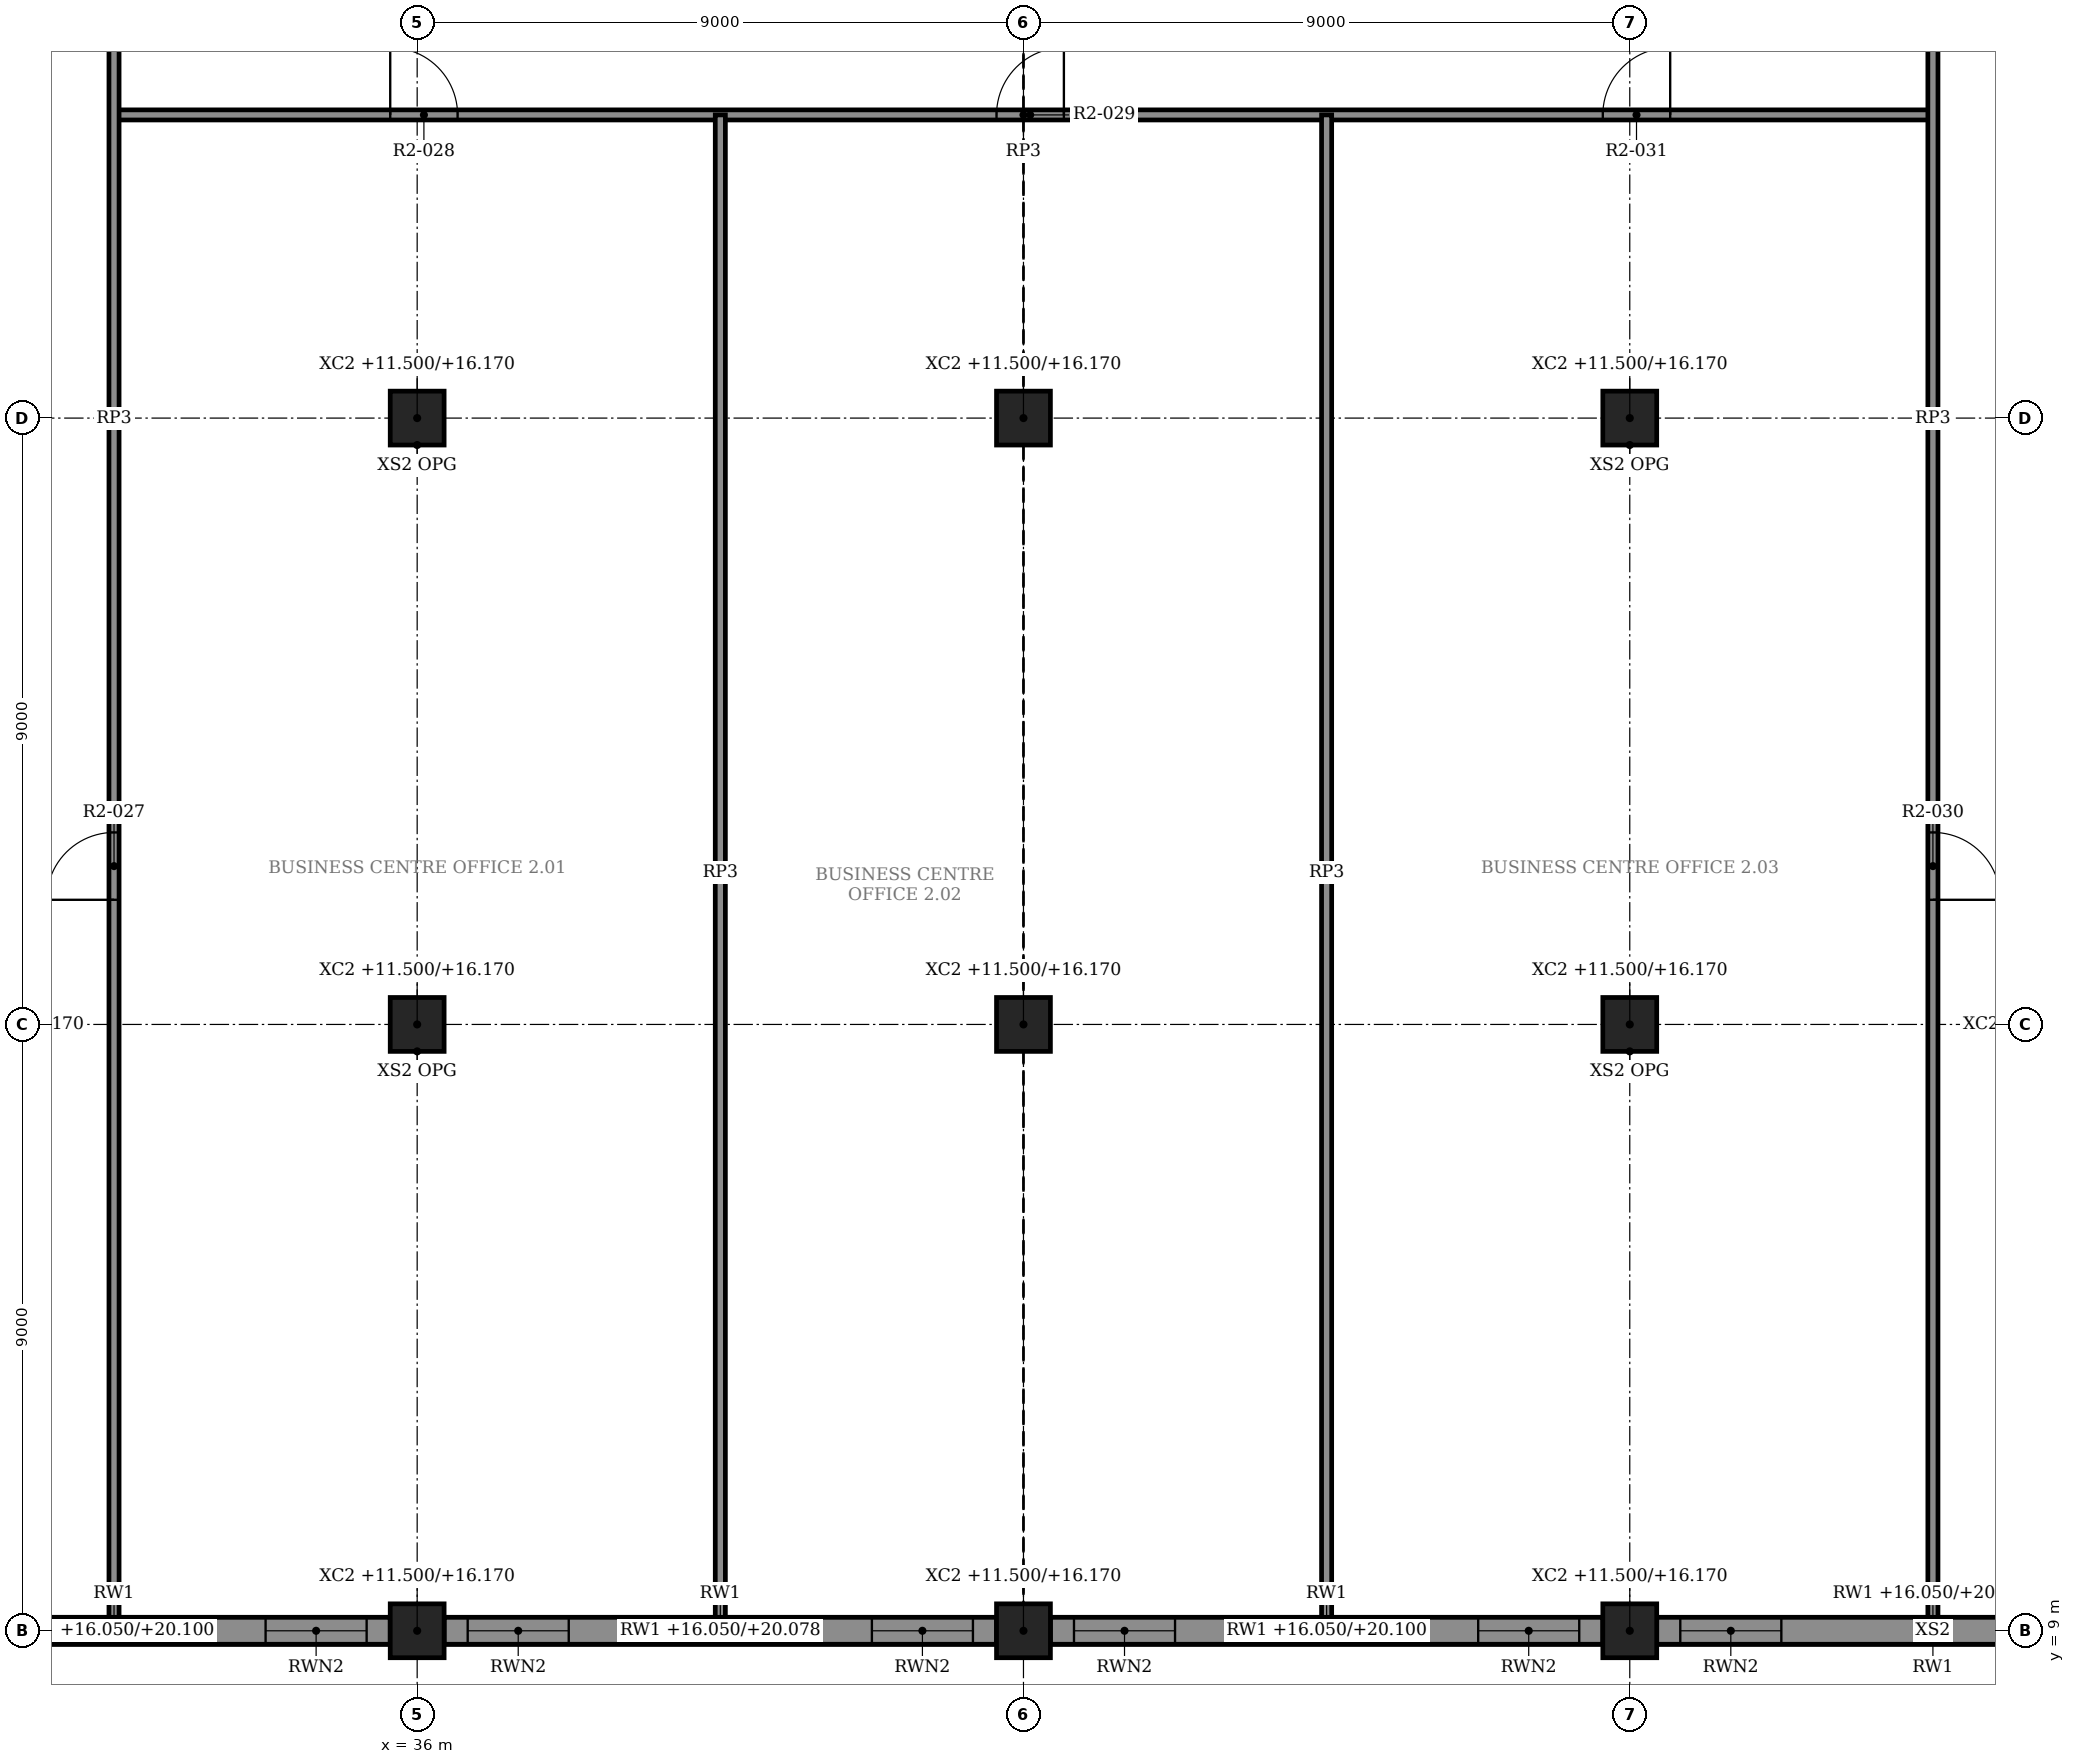
"""IFC4 building model, lengths in metres.
Left out: names, types, materials, properties, quantities, classifications, styles, units other than length and angle.
Written with IfcOpenShell. Run it as: python <this file> out.ifc"""

import sys

from ifc_helpers import new_model, si_unit, direction, frame, frame_2d, origin, origin_2d, place, context, subcontext, project, spatial, polyline, rectangle, outline, extrude, element, fill, save


model = new_model("IFC4")
c1 = context("Model", 3, precision=1e-05, world=origin(), true_north=direction((0.0, 1.0)))
c2 = subcontext(c1, "Body", "Model", "MODEL_VIEW")
j1 = project(units=[si_unit("LENGTHUNIT", "METRE"), si_unit("PLANEANGLEUNIT", "RADIAN")], contexts=[c1])
p1 = place(None, origin())
s1 = spatial("IfcSite", under=j1, at=p1, CompositionType="ELEMENT")
p2 = place(p1, origin())
s2 = spatial("IfcBuilding", under=s1, at=p2, CompositionType="ELEMENT")
p3 = place(p2, frame((0.0, 0.0, 11.5)))
s3 = spatial("IfcBuildingStorey", under=s2, at=p3, CompositionType="ELEMENT", Elevation=11.5)
for number, where, z_axis, x_axis in (
    (1, (36.0, 9.0, 0.0), (0.0, 0.0, 1.0), (1.0, 0.0, 0.0)),
    (2, (36.0, 18.0, 0.0), (0.0, 0.0, 1.0), (1.0, 0.0, 0.0)),
    (3, (36.0, 27.0, 0.0), (0.0, 0.0, 1.0), (1.0, 0.0, 0.0)),
    (4, (45.0, 9.0, 0.0), (0.0, 0.0, 1.0), (1.0, 0.0, 0.0)),
    (5, (45.0, 18.0, 0.0), (0.0, 0.0, 1.0), (1.0, 0.0, 0.0)),
    (6, (45.0, 27.0, 0.0), (0.0, 0.0, 1.0), (1.0, 0.0, 0.0)),
    (7, (54.0, 9.0, 0.0), (0.0, 0.0, 1.0), (1.0, 0.0, 0.0)),
    (8, (54.0, 18.0, 0.0), (0.0, 0.0, 1.0), (1.0, 0.0, 0.0)),
    (9, (54.0, 27.0, 0.0), (0.0, 0.0, 1.0), (1.0, 0.0, 0.0)),
):
    element("IfcColumn", number, at=place(p3, frame(where, z_axis=z_axis, x_axis=x_axis)), inside=s3, PredefinedType="COLUMN", context=c2, shape_type="SweptSolid", body=[
        extrude(rectangle(XDim=0.8, YDim=0.8, at=origin_2d()), origin(), (0.0, 0.0, 1.0), 4.67),
    ])
p4 = place(p3, frame((27.0, 9.0, 4.55), z_axis=(0.0, 0.0, 1.0), x_axis=(1.0, 0.0, 0.0)))
e10 = element("IfcWall", 10, at=p4, inside=s3, PredefinedType="SOLIDWALL", context=c2, shape_type="SweptSolid", body=[
    extrude(outline(polyline([(0.0, 0.0), (9.0, 0.0), (9.0, 1.55), (8.961, 1.55), (4.461, 4.05), (0.039, 4.05), (0.0, 4.028), (0.0, 0.0)])), frame((0.0, 0.2, 0.0), z_axis=(0.0, -1.0, 0.0), x_axis=(1.0, 0.0, 0.0)), (0.0, 0.0, 1.0), 0.4),
])
p5 = place(p3, frame((36.0, 9.0, 4.55), z_axis=(0.0, 0.0, 1.0), x_axis=(1.0, 0.0, 0.0)))
e11 = element("IfcWall", 11, at=p5, inside=s3, PredefinedType="SOLIDWALL", context=c2, shape_type="SweptSolid", body=[
    extrude(outline(polyline([(0.0, 0.0), (9.0, 0.0), (9.0, 4.028), (4.539, 1.55), (0.0, 1.55), (0.0, 0.0)])), frame((0.0, 0.2, 0.0), z_axis=(0.0, -1.0, 0.0), x_axis=(1.0, 0.0, 0.0)), (0.0, 0.0, 1.0), 0.4),
])
p6 = place(p3, frame((45.0, 9.0, 4.55), z_axis=(0.0, 0.0, 1.0), x_axis=(1.0, 0.0, 0.0)))
e12 = element("IfcWall", 12, at=p6, inside=s3, PredefinedType="SOLIDWALL", context=c2, shape_type="SweptSolid", body=[
    extrude(outline(polyline([(0.0, 0.0), (9.0, 0.0), (9.0, 1.55), (8.961, 1.55), (4.461, 4.05), (0.039, 4.05), (0.0, 4.028), (0.0, 0.0)])), frame((0.0, 0.2, 0.0), z_axis=(0.0, -1.0, 0.0), x_axis=(1.0, 0.0, 0.0)), (0.0, 0.0, 1.0), 0.4),
])
p7 = place(p3, frame((54.0, 9.0, 4.55), z_axis=(0.0, 0.0, 1.0), x_axis=(1.0, 0.0, 0.0)))
e13 = element("IfcWall", 13, at=p7, inside=s3, PredefinedType="SOLIDWALL", context=c2, shape_type="SweptSolid", body=[
    extrude(outline(polyline([(0.0, 0.0), (9.0, 0.0), (9.0, 4.028), (4.539, 1.55), (0.0, 1.55), (0.0, 0.0)])), frame((0.0, 0.2, 0.0), z_axis=(0.0, -1.0, 0.0), x_axis=(1.0, 0.0, 0.0)), (0.0, 0.0, 1.0), 0.4),
])
p8 = place(p3, frame((27.4, 9.0, 0.0), z_axis=(0.0, 0.0, 1.0), x_axis=(1.0, 0.0, 0.0)))
e14 = element("IfcWall", 14, at=p8, inside=s3, PredefinedType="SOLIDWALL", context=c2, shape_type="SweptSolid", body=[
    extrude(rectangle(XDim=8.2, YDim=0.4, at=frame_2d((4.1, 0.0))), origin(), (0.0, 0.0, 1.0), 4.55),
])
p9 = place(p8, frame((0.35, 0.0, 0.9)))
e15 = element("IfcOpeningElement", 15, at=p9, cuts=e14, PredefinedType="OPENING", context=c2, shape_type="SweptSolid", body=[
    extrude(rectangle(XDim=1.5, YDim=2.4, at=frame_2d((0.75, 1.2))), frame((0.0, 0.21, 0.0), z_axis=(0.0, -1.0, 0.0), x_axis=(1.0, 0.0, 0.0)), (0.0, 0.0, 1.0), 0.42),
])
p10 = place(p8, frame((6.35, 0.0, 0.9)))
e16 = element("IfcOpeningElement", 16, at=p10, cuts=e14, PredefinedType="OPENING", context=c2, shape_type="SweptSolid", body=[
    extrude(rectangle(XDim=1.5, YDim=2.4, at=frame_2d((0.75, 1.2))), frame((0.0, 0.21, 0.0), z_axis=(0.0, -1.0, 0.0), x_axis=(1.0, 0.0, 0.0)), (0.0, 0.0, 1.0), 0.42),
])
p11 = place(p3, frame((36.4, 9.0, 0.0), z_axis=(0.0, 0.0, 1.0), x_axis=(1.0, 0.0, 0.0)))
e17 = element("IfcWall", 17, at=p11, inside=s3, PredefinedType="SOLIDWALL", context=c2, shape_type="SweptSolid", body=[
    extrude(rectangle(XDim=8.2, YDim=0.4, at=frame_2d((4.1, 0.0))), origin(), (0.0, 0.0, 1.0), 4.55),
])
p12 = place(p11, frame((0.35, 0.0, 0.9)))
e18 = element("IfcOpeningElement", 18, at=p12, cuts=e17, PredefinedType="OPENING", context=c2, shape_type="SweptSolid", body=[
    extrude(rectangle(XDim=1.5, YDim=2.4, at=frame_2d((0.75, 1.2))), frame((0.0, 0.21, 0.0), z_axis=(0.0, -1.0, 0.0), x_axis=(1.0, 0.0, 0.0)), (0.0, 0.0, 1.0), 0.42),
])
p13 = place(p11, frame((6.35, 0.0, 0.9)))
e19 = element("IfcOpeningElement", 19, at=p13, cuts=e17, PredefinedType="OPENING", context=c2, shape_type="SweptSolid", body=[
    extrude(rectangle(XDim=1.5, YDim=2.4, at=frame_2d((0.75, 1.2))), frame((0.0, 0.21, 0.0), z_axis=(0.0, -1.0, 0.0), x_axis=(1.0, 0.0, 0.0)), (0.0, 0.0, 1.0), 0.42),
])
p14 = place(p3, frame((45.4, 9.0, 0.0), z_axis=(0.0, 0.0, 1.0), x_axis=(1.0, 0.0, 0.0)))
e20 = element("IfcWall", 20, at=p14, inside=s3, PredefinedType="SOLIDWALL", context=c2, shape_type="SweptSolid", body=[
    extrude(rectangle(XDim=8.2, YDim=0.4, at=frame_2d((4.1, 0.0))), origin(), (0.0, 0.0, 1.0), 4.55),
])
p15 = place(p14, frame((0.35, 0.0, 0.9)))
e21 = element("IfcOpeningElement", 21, at=p15, cuts=e20, PredefinedType="OPENING", context=c2, shape_type="SweptSolid", body=[
    extrude(rectangle(XDim=1.5, YDim=2.4, at=frame_2d((0.75, 1.2))), frame((0.0, 0.21, 0.0), z_axis=(0.0, -1.0, 0.0), x_axis=(1.0, 0.0, 0.0)), (0.0, 0.0, 1.0), 0.42),
])
p16 = place(p14, frame((6.35, 0.0, 0.9)))
e22 = element("IfcOpeningElement", 22, at=p16, cuts=e20, PredefinedType="OPENING", context=c2, shape_type="SweptSolid", body=[
    extrude(rectangle(XDim=1.5, YDim=2.4, at=frame_2d((0.75, 1.2))), frame((0.0, 0.21, 0.0), z_axis=(0.0, -1.0, 0.0), x_axis=(1.0, 0.0, 0.0)), (0.0, 0.0, 1.0), 0.42),
])
p17 = place(p3, frame((54.4, 9.0, 0.0), z_axis=(0.0, 0.0, 1.0), x_axis=(1.0, 0.0, 0.0)))
e23 = element("IfcWall", 23, at=p17, inside=s3, PredefinedType="SOLIDWALL", context=c2, shape_type="SweptSolid", body=[
    extrude(rectangle(XDim=8.2, YDim=0.4, at=frame_2d((4.1, 0.0))), origin(), (0.0, 0.0, 1.0), 4.55),
])
p18 = place(p17, frame((0.35, 0.0, 0.9)))
e24 = element("IfcOpeningElement", 24, at=p18, cuts=e23, PredefinedType="OPENING", context=c2, shape_type="SweptSolid", body=[
    extrude(rectangle(XDim=1.5, YDim=2.4, at=frame_2d((0.75, 1.2))), frame((0.0, 0.21, 0.0), z_axis=(0.0, -1.0, 0.0), x_axis=(1.0, 0.0, 0.0)), (0.0, 0.0, 1.0), 0.42),
])
p19 = place(p17, frame((6.35, 0.0, 0.9)))
e25 = element("IfcOpeningElement", 25, at=p19, cuts=e23, PredefinedType="OPENING", context=c2, shape_type="SweptSolid", body=[
    extrude(rectangle(XDim=1.5, YDim=2.4, at=frame_2d((0.75, 1.2))), frame((0.0, 0.21, 0.0), z_axis=(0.0, -1.0, 0.0), x_axis=(1.0, 0.0, 0.0)), (0.0, 0.0, 1.0), 0.42),
])
p20 = place(p3, frame((31.5, 31.5, 0.0), z_axis=(0.0, 0.0, 1.0), x_axis=(1.0, 0.0, 0.0)))
e26 = element("IfcWall", 26, at=p20, inside=s3, PredefinedType="PARTITIONING", context=c2, shape_type="SweptSolid", body=[
    extrude(rectangle(XDim=27.0, YDim=0.15, at=frame_2d((13.5, 0.0))), origin(), (0.0, 0.0, 1.0), 4.55),
])
p21 = place(p20, frame((4.1, 0.0, 0.0)))
e27 = element("IfcOpeningElement", 27, at=p21, cuts=e26, PredefinedType="OPENING", context=c2, shape_type="SweptSolid", body=[
    extrude(rectangle(XDim=1.0, YDim=2.4, at=frame_2d((0.5, 1.2))), frame((0.0, 0.085, 0.0), z_axis=(0.0, -1.0, 0.0), x_axis=(1.0, 0.0, 0.0)), (0.0, 0.0, 1.0), 0.17),
])
p22 = place(p20, frame((13.1, 0.0, 0.0)))
e28 = element("IfcOpeningElement", 28, at=p22, cuts=e26, PredefinedType="OPENING", context=c2, shape_type="SweptSolid", body=[
    extrude(rectangle(XDim=1.0, YDim=2.4, at=frame_2d((0.5, 1.2))), frame((0.0, 0.085, 0.0), z_axis=(0.0, -1.0, 0.0), x_axis=(1.0, 0.0, 0.0)), (0.0, 0.0, 1.0), 0.17),
])
p23 = place(p20, frame((22.1, 0.0, 0.0)))
e29 = element("IfcOpeningElement", 29, at=p23, cuts=e26, PredefinedType="OPENING", context=c2, shape_type="SweptSolid", body=[
    extrude(rectangle(XDim=1.0, YDim=2.4, at=frame_2d((0.5, 1.2))), frame((0.0, 0.085, 0.0), z_axis=(0.0, -1.0, 0.0), x_axis=(1.0, 0.0, 0.0)), (0.0, 0.0, 1.0), 0.17),
])
p24 = place(p3, frame((31.5, 9.0, 0.0), z_axis=(0.0, 0.0, 1.0), x_axis=(0.0, 1.0, 0.0)))
e30 = element("IfcWall", 30, at=p24, inside=s3, PredefinedType="PARTITIONING", context=c2, shape_type="SweptSolid", body=[
    extrude(rectangle(XDim=36.0, YDim=0.15, at=frame_2d((18.0, 0.0))), origin(), (0.0, 0.0, 1.0), 4.55),
])
p25 = place(p24, frame((10.85, 0.0, 0.0)))
e31 = element("IfcOpeningElement", 31, at=p25, cuts=e30, PredefinedType="OPENING", context=c2, shape_type="SweptSolid", body=[
    extrude(rectangle(XDim=1.0, YDim=2.4, at=frame_2d((0.5, 1.2))), frame((0.0, 0.085, 0.0), z_axis=(0.0, -1.0, 0.0), x_axis=(1.0, 0.0, 0.0)), (0.0, 0.0, 1.0), 0.17),
])
p26 = place(p24, frame((30.85, 0.0, 0.0)))
e32 = element("IfcOpeningElement", 32, at=p26, cuts=e30, PredefinedType="OPENING", context=c2, shape_type="SweptSolid", body=[
    extrude(rectangle(XDim=1.2, YDim=2.4, at=frame_2d((0.6, 1.2))), frame((0.0, 0.085, 0.0), z_axis=(0.0, -1.0, 0.0), x_axis=(1.0, 0.0, 0.0)), (0.0, 0.0, 1.0), 0.17),
])
for number, where, z_axis, x_axis in (
    (33, (40.5, 9.0, 0.0), (0.0, 0.0, 1.0), (0.0, 1.0, 0.0)),
    (34, (49.5, 9.0, 0.0), (0.0, 0.0, 1.0), (0.0, 1.0, 0.0)),
):
    element("IfcWall", number, at=place(p3, frame(where, z_axis=z_axis, x_axis=x_axis)), inside=s3, PredefinedType="PARTITIONING", context=c2, shape_type="SweptSolid", body=[
        extrude(rectangle(XDim=22.5, YDim=0.15, at=frame_2d((11.25, 0.0))), origin(), (0.0, 0.0, 1.0), 4.55),
    ])
p27 = place(p3, frame((58.5, 9.0, 0.0), z_axis=(0.0, 0.0, 1.0), x_axis=(0.0, 1.0, 0.0)))
e35 = element("IfcWall", 35, at=p27, inside=s3, PredefinedType="PARTITIONING", context=c2, shape_type="SweptSolid", body=[
    extrude(rectangle(XDim=36.0, YDim=0.15, at=frame_2d((18.0, 0.0))), origin(), (0.0, 0.0, 1.0), 4.55),
])
p28 = place(p27, frame((10.85, 0.0, 0.0)))
e36 = element("IfcOpeningElement", 36, at=p28, cuts=e35, PredefinedType="OPENING", context=c2, shape_type="SweptSolid", body=[
    extrude(rectangle(XDim=1.0, YDim=2.4, at=frame_2d((0.5, 1.2))), frame((0.0, 0.085, 0.0), z_axis=(0.0, -1.0, 0.0), x_axis=(1.0, 0.0, 0.0)), (0.0, 0.0, 1.0), 0.17),
])
p29 = place(p27, frame((30.85, 0.0, 0.0)))
e37 = element("IfcOpeningElement", 37, at=p29, cuts=e35, PredefinedType="OPENING", context=c2, shape_type="SweptSolid", body=[
    extrude(rectangle(XDim=1.2, YDim=2.4, at=frame_2d((0.6, 1.2))), frame((0.0, 0.085, 0.0), z_axis=(0.0, -1.0, 0.0), x_axis=(1.0, 0.0, 0.0)), (0.0, 0.0, 1.0), 0.17),
])
p30 = place(p10, origin())
e38 = element("IfcWindow", 38, at=p30, inside=s3, PartitioningType="SINGLE_PANEL", PredefinedType="WINDOW", context=c2, shape_type="SweptSolid", body=[
    extrude(rectangle(XDim=1.5, YDim=2.4, at=frame_2d((0.75, 1.2))), frame((0.0, 0.03, 0.0), z_axis=(0.0, -1.0, 0.0), x_axis=(1.0, 0.0, 0.0)), (0.0, 0.0, 1.0), 0.06),
])
fill(e16, e38)
p31 = place(p12, origin())
e39 = element("IfcWindow", 39, at=p31, inside=s3, PartitioningType="SINGLE_PANEL", PredefinedType="WINDOW", context=c2, shape_type="SweptSolid", body=[
    extrude(rectangle(XDim=1.5, YDim=2.4, at=frame_2d((0.75, 1.2))), frame((0.0, 0.03, 0.0), z_axis=(0.0, -1.0, 0.0), x_axis=(1.0, 0.0, 0.0)), (0.0, 0.0, 1.0), 0.06),
])
fill(e18, e39)
p32 = place(p13, origin())
e40 = element("IfcWindow", 40, at=p32, inside=s3, PartitioningType="SINGLE_PANEL", PredefinedType="WINDOW", context=c2, shape_type="SweptSolid", body=[
    extrude(rectangle(XDim=1.5, YDim=2.4, at=frame_2d((0.75, 1.2))), frame((0.0, 0.03, 0.0), z_axis=(0.0, -1.0, 0.0), x_axis=(1.0, 0.0, 0.0)), (0.0, 0.0, 1.0), 0.06),
])
fill(e19, e40)
p33 = place(p15, origin())
e41 = element("IfcWindow", 41, at=p33, inside=s3, PartitioningType="SINGLE_PANEL", PredefinedType="WINDOW", context=c2, shape_type="SweptSolid", body=[
    extrude(rectangle(XDim=1.5, YDim=2.4, at=frame_2d((0.75, 1.2))), frame((0.0, 0.03, 0.0), z_axis=(0.0, -1.0, 0.0), x_axis=(1.0, 0.0, 0.0)), (0.0, 0.0, 1.0), 0.06),
])
fill(e21, e41)
p34 = place(p16, origin())
e42 = element("IfcWindow", 42, at=p34, inside=s3, PartitioningType="SINGLE_PANEL", PredefinedType="WINDOW", context=c2, shape_type="SweptSolid", body=[
    extrude(rectangle(XDim=1.5, YDim=2.4, at=frame_2d((0.75, 1.2))), frame((0.0, 0.03, 0.0), z_axis=(0.0, -1.0, 0.0), x_axis=(1.0, 0.0, 0.0)), (0.0, 0.0, 1.0), 0.06),
])
fill(e22, e42)
p35 = place(p18, origin())
e43 = element("IfcWindow", 43, at=p35, inside=s3, PartitioningType="SINGLE_PANEL", PredefinedType="WINDOW", context=c2, shape_type="SweptSolid", body=[
    extrude(rectangle(XDim=1.5, YDim=2.4, at=frame_2d((0.75, 1.2))), frame((0.0, 0.03, 0.0), z_axis=(0.0, -1.0, 0.0), x_axis=(1.0, 0.0, 0.0)), (0.0, 0.0, 1.0), 0.06),
])
fill(e24, e43)
p36 = place(p25, origin())
e44 = element("IfcDoor", 44, at=p36, inside=s3, OperationType="SINGLE_SWING_LEFT", PredefinedType="DOOR", context=c2, shape_type="SweptSolid", body=[
    extrude(rectangle(XDim=1.0, YDim=2.4, at=frame_2d((0.5, 1.2))), frame((0.0, 0.025, 0.0), z_axis=(0.0, -1.0, 0.0), x_axis=(1.0, 0.0, 0.0)), (0.0, 0.0, 1.0), 0.05),
])
fill(e31, e44)
p37 = place(p21, origin())
e45 = element("IfcDoor", 45, at=p37, inside=s3, OperationType="SINGLE_SWING_LEFT", PredefinedType="DOOR", context=c2, shape_type="SweptSolid", body=[
    extrude(rectangle(XDim=1.0, YDim=2.4, at=frame_2d((0.5, 1.2))), frame((0.0, 0.025, 0.0), z_axis=(0.0, -1.0, 0.0), x_axis=(1.0, 0.0, 0.0)), (0.0, 0.0, 1.0), 0.05),
])
fill(e27, e45)
p38 = place(p22, origin())
e46 = element("IfcDoor", 46, at=p38, inside=s3, OperationType="SINGLE_SWING_LEFT", PredefinedType="DOOR", context=c2, shape_type="SweptSolid", body=[
    extrude(rectangle(XDim=1.0, YDim=2.4, at=frame_2d((0.5, 1.2))), frame((0.0, 0.025, 0.0), z_axis=(0.0, -1.0, 0.0), x_axis=(1.0, 0.0, 0.0)), (0.0, 0.0, 1.0), 0.05),
])
fill(e28, e46)
p39 = place(p28, frame((1.0, 0.0, 0.0), z_axis=(0.0, 0.0, 1.0), x_axis=(-1.0, 0.0, 0.0)))
e47 = element("IfcDoor", 47, at=p39, inside=s3, OperationType="SINGLE_SWING_LEFT", PredefinedType="DOOR", context=c2, shape_type="SweptSolid", body=[
    extrude(rectangle(XDim=1.0, YDim=2.4, at=frame_2d((0.5, 1.2))), frame((0.0, 0.025, 0.0), z_axis=(0.0, -1.0, 0.0), x_axis=(1.0, 0.0, 0.0)), (0.0, 0.0, 1.0), 0.05),
])
fill(e36, e47)
p40 = place(p23, origin())
e48 = element("IfcDoor", 48, at=p40, inside=s3, OperationType="SINGLE_SWING_LEFT", PredefinedType="DOOR", context=c2, shape_type="SweptSolid", body=[
    extrude(rectangle(XDim=1.0, YDim=2.4, at=frame_2d((0.5, 1.2))), frame((0.0, 0.025, 0.0), z_axis=(0.0, -1.0, 0.0), x_axis=(1.0, 0.0, 0.0)), (0.0, 0.0, 1.0), 0.05),
])
fill(e29, e48)
save(model, sys.argv[1])
